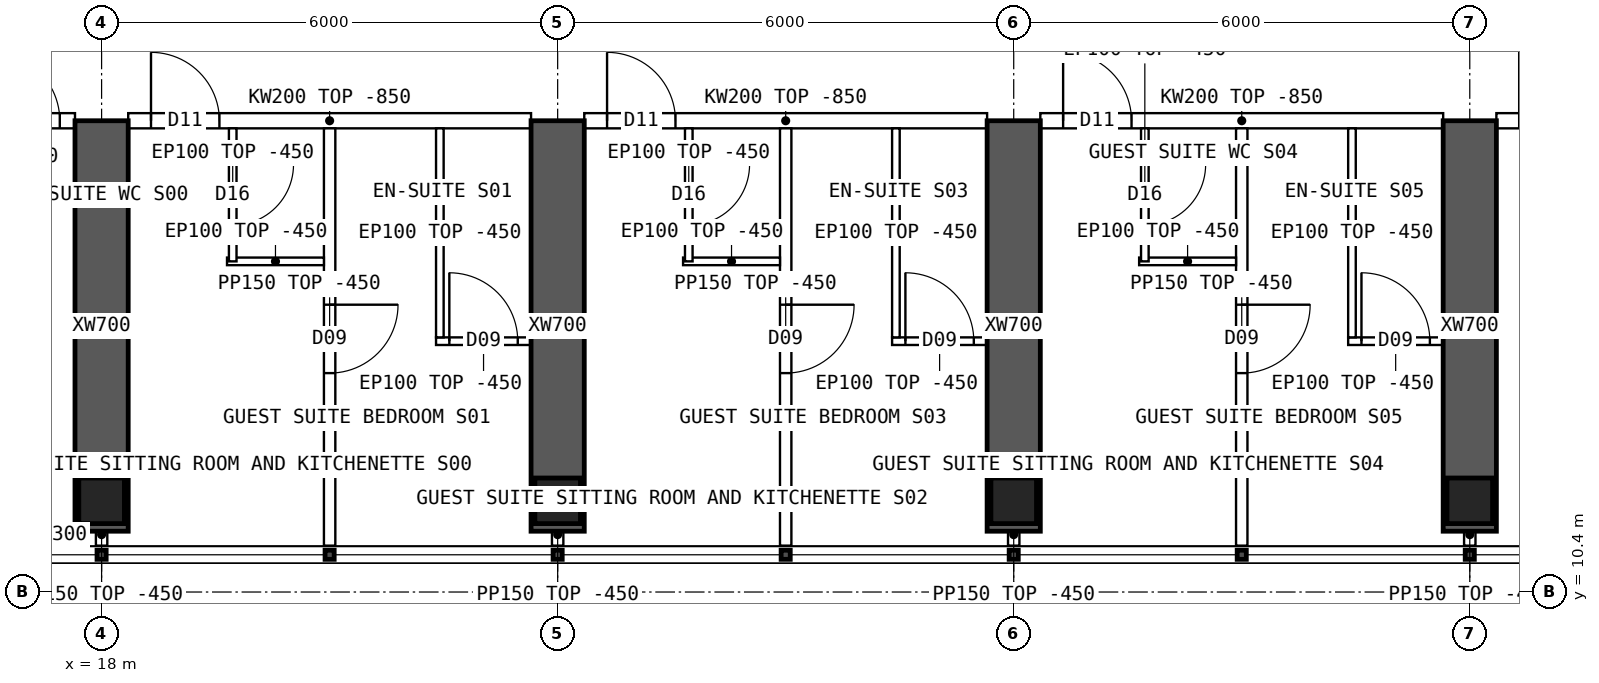
"""IFC4 building model, lengths in metres.
Left out: names, types, materials, properties, quantities, classifications, styles, units other than length and angle.
Written with IfcOpenShell. Run it as: python <this file> out.ifc"""

import sys

from ifc_helpers import new_model, si_unit, direction, frame, frame_2d, origin, origin_2d, place, context, subcontext, project, spatial, polyline, rectangle, hollow_rectangle, outline, extrude, element, fill, save


model = new_model("IFC4")
c1 = context("Model", 3, precision=1e-05, world=origin(), true_north=direction((0.0, 1.0)))
c2 = subcontext(c1, "Body", "Model", "MODEL_VIEW")
j1 = project(units=[si_unit("LENGTHUNIT", "METRE"), si_unit("PLANEANGLEUNIT", "RADIAN")], contexts=[c1])
p1 = place(None, origin())
s1 = spatial("IfcSite", under=j1, at=p1, CompositionType="ELEMENT")
p2 = place(p1, origin())
s2 = spatial("IfcBuilding", under=s1, at=p2, CompositionType="ELEMENT")
p3 = place(p2, frame((0.0, 0.0, 242.8)))
s3 = spatial("IfcBuildingStorey", under=s2, at=p3, CompositionType="ELEMENT", Elevation=242.8)
for number, where, z_axis, x_axis in (
    (1, (18.0, 11.6, 0.0), (0.0, 0.0, 1.0), (1.0, 0.0, 0.0)),
    (2, (24.0, 11.6, 0.0), (0.0, 0.0, 1.0), (1.0, 0.0, 0.0)),
    (3, (30.0, 11.6, 0.0), (0.0, 0.0, 1.0), (1.0, 0.0, 0.0)),
    (4, (36.0, 11.6, 0.0), (0.0, 0.0, 1.0), (1.0, 0.0, 0.0)),
):
    element("IfcColumn", number, at=place(p3, frame(where, z_axis=z_axis, x_axis=x_axis)), inside=s3, PredefinedType="COLUMN", context=c2, shape_type="SweptSolid", body=[
        extrude(hollow_rectangle(XDim=0.6, YDim=0.6, WallThickness=0.06, at=origin_2d()), origin(), (0.0, 0.0, 1.0), 3.75),
    ])
for number, where, z_axis, x_axis in (
    (5, (18.0, 11.2, 0.0), (0.0, 0.0, 1.0), (0.0, 1.0, 0.0)),
    (6, (24.0, 11.2, 0.0), (0.0, 0.0, 1.0), (0.0, 1.0, 0.0)),
    (7, (30.0, 11.2, 0.0), (0.0, 0.0, 1.0), (0.0, 1.0, 0.0)),
    (8, (36.0, 11.2, 0.0), (0.0, 0.0, 1.0), (0.0, 1.0, 0.0)),
):
    element("IfcWall", number, at=place(p3, frame(where, z_axis=z_axis, x_axis=x_axis)), inside=s3, PredefinedType="SHEAR", context=c2, shape_type="SweptSolid", body=[
        extrude(rectangle(XDim=5.4, YDim=0.7, at=frame_2d((2.7, 0.0))), origin(), (0.0, 0.0, 1.0), 3.75),
    ])
p4 = place(p3, frame((17.2, 11.15, 0.0), z_axis=(0.0, 0.0, 1.0), x_axis=(1.0, 0.0, 0.0)))
e9 = element("IfcWall", 9, at=p4, inside=s3, PredefinedType="SOLIDWALL", context=c2, shape_type="SweptSolid", body=[
    extrude(rectangle(XDim=0.45, YDim=0.3, at=frame_2d((0.225, 0.0))), origin(), (0.0, 0.0, 1.0), 3.3),
])
p5 = place(p3, frame((15.6, 16.6, 0.0), z_axis=(0.0, 0.0, 1.0), x_axis=(1.0, 0.0, 0.0)))
e10 = element("IfcWall", 10, at=p5, inside=s3, PredefinedType="SOLIDWALL", context=c2, shape_type="SweptSolid", body=[
    extrude(rectangle(XDim=2.05, YDim=0.2, at=frame_2d((1.025, 0.0))), origin(), (0.0, 0.0, 1.0), 3.3),
])
p6 = place(p5, frame((0.95, 0.0, 0.0)))
e11 = element("IfcOpeningElement", 11, at=p6, cuts=e10, PredefinedType="OPENING", context=c2, shape_type="SweptSolid", body=[
    extrude(rectangle(XDim=0.9, YDim=2.1, at=frame_2d((0.45, 1.05))), frame((0.0, 0.11, 0.0), z_axis=(0.0, -1.0, 0.0), x_axis=(1.0, 0.0, 0.0)), (0.0, 0.0, 1.0), 0.22),
])
p7 = place(p3, frame((18.35, 16.6, 0.0), z_axis=(0.0, 0.0, 1.0), x_axis=(1.0, 0.0, 0.0)))
e12 = element("IfcWall", 12, at=p7, inside=s3, PredefinedType="SOLIDWALL", context=c2, shape_type="SweptSolid", body=[
    extrude(outline(polyline([(0.0, 0.0), (5.3, 0.0), (5.3, 2.9), (0.0, 2.9), (0.0, 0.0)])), frame((0.0, 0.1, 0.0), z_axis=(0.0, -1.0, 0.0), x_axis=(1.0, 0.0, 0.0)), (0.0, 0.0, 1.0), 0.2),
])
p8 = place(p7, frame((0.3, 0.0, 0.0)))
e13 = element("IfcOpeningElement", 13, at=p8, cuts=e12, PredefinedType="OPENING", context=c2, shape_type="SweptSolid", body=[
    extrude(rectangle(XDim=0.9, YDim=2.1, at=frame_2d((0.45, 1.05))), frame((0.0, 0.11, 0.0), z_axis=(0.0, -1.0, 0.0), x_axis=(1.0, 0.0, 0.0)), (0.0, 0.0, 1.0), 0.22),
])
p9 = place(p3, frame((24.35, 16.6, 0.0), z_axis=(0.0, 0.0, 1.0), x_axis=(1.0, 0.0, 0.0)))
e14 = element("IfcWall", 14, at=p9, inside=s3, PredefinedType="SOLIDWALL", context=c2, shape_type="SweptSolid", body=[
    extrude(outline(polyline([(0.0, 0.0), (5.3, 0.0), (5.3, 2.9), (0.0, 2.9), (0.0, 0.0)])), frame((0.0, 0.1, 0.0), z_axis=(0.0, -1.0, 0.0), x_axis=(1.0, 0.0, 0.0)), (0.0, 0.0, 1.0), 0.2),
])
p10 = place(p9, frame((0.3, 0.0, 0.0)))
e15 = element("IfcOpeningElement", 15, at=p10, cuts=e14, PredefinedType="OPENING", context=c2, shape_type="SweptSolid", body=[
    extrude(rectangle(XDim=0.9, YDim=2.1, at=frame_2d((0.45, 1.05))), frame((0.0, 0.11, 0.0), z_axis=(0.0, -1.0, 0.0), x_axis=(1.0, 0.0, 0.0)), (0.0, 0.0, 1.0), 0.22),
])
p11 = place(p3, frame((30.35, 16.6, 0.0), z_axis=(0.0, 0.0, 1.0), x_axis=(1.0, 0.0, 0.0)))
e16 = element("IfcWall", 16, at=p11, inside=s3, PredefinedType="SOLIDWALL", context=c2, shape_type="SweptSolid", body=[
    extrude(outline(polyline([(0.0, 0.0), (5.3, 0.0), (5.3, 2.9), (0.0, 2.9), (0.0, 0.0)])), frame((0.0, 0.1, 0.0), z_axis=(0.0, -1.0, 0.0), x_axis=(1.0, 0.0, 0.0)), (0.0, 0.0, 1.0), 0.2),
])
p12 = place(p11, frame((0.3, 0.0, 0.0)))
e17 = element("IfcOpeningElement", 17, at=p12, cuts=e16, PredefinedType="OPENING", context=c2, shape_type="SweptSolid", body=[
    extrude(rectangle(XDim=0.9, YDim=2.1, at=frame_2d((0.45, 1.05))), frame((0.0, 0.11, 0.0), z_axis=(0.0, -1.0, 0.0), x_axis=(1.0, 0.0, 0.0)), (0.0, 0.0, 1.0), 0.22),
])
p13 = place(p3, frame((36.35, 16.6, 0.0), z_axis=(0.0, 0.0, 1.0), x_axis=(1.0, 0.0, 0.0)))
e18 = element("IfcWall", 18, at=p13, inside=s3, PredefinedType="SOLIDWALL", context=c2, shape_type="SweptSolid", body=[
    extrude(outline(polyline([(0.0, 0.0), (5.3, 0.0), (5.3, 2.9), (0.0, 2.9), (0.0, 0.0)])), frame((0.0, 0.1, 0.0), z_axis=(0.0, -1.0, 0.0), x_axis=(1.0, 0.0, 0.0)), (0.0, 0.0, 1.0), 0.2),
])
p14 = place(p13, frame((0.3, 0.0, 0.0)))
e19 = element("IfcOpeningElement", 19, at=p14, cuts=e18, PredefinedType="OPENING", context=c2, shape_type="SweptSolid", body=[
    extrude(rectangle(XDim=1.0, YDim=2.1, at=frame_2d((0.5, 1.05))), frame((0.0, 0.11, 0.0), z_axis=(0.0, -1.0, 0.0), x_axis=(1.0, 0.0, 0.0)), (0.0, 0.0, 1.0), 0.22),
])
p15 = place(p3, frame((21.0, 11.01, 0.0), z_axis=(0.0, 0.0, 1.0), x_axis=(0.0, 1.0, 0.0)))
e20 = element("IfcWall", 20, at=p15, inside=s3, PredefinedType="PARTITIONING", context=c2, shape_type="SweptSolid", body=[
    extrude(outline(polyline([(0.0, 0.0), (5.49, 0.0), (5.49, 2.9), (5.442, 2.9), (5.44, 3.3), (0.792, 3.3), (0.79, 2.9), (0.392, 2.9), (0.39, 3.3), (0.0, 3.3), (0.0, 0.0)])), frame((0.0, 0.075, 0.0), z_axis=(0.0, -1.0, 0.0), x_axis=(1.0, 0.0, 0.0)), (0.0, 0.0, 1.0), 0.15),
])
p16 = place(p15, frame((2.27, 0.0, 0.0)))
e21 = element("IfcOpeningElement", 21, at=p16, cuts=e20, PredefinedType="OPENING", context=c2, shape_type="SweptSolid", body=[
    extrude(rectangle(XDim=0.9, YDim=2.1, at=frame_2d((0.45, 1.05))), frame((0.0, 0.085, 0.0), z_axis=(0.0, -1.0, 0.0), x_axis=(1.0, 0.0, 0.0)), (0.0, 0.0, 1.0), 0.17),
])
p17 = place(p3, frame((23.65, 13.7, 0.0), z_axis=(0.0, 0.0, 1.0), x_axis=(-1.0, 0.0, 0.0)))
e22 = element("IfcWall", 22, at=p17, inside=s3, PredefinedType="PARTITIONING", context=c2, shape_type="SweptSolid", body=[
    extrude(rectangle(XDim=1.25, YDim=0.1, at=frame_2d((0.625, 0.0))), origin(), (0.0, 0.0, 1.0), 3.3),
])
p18 = place(p17, frame((0.175, 0.0, 0.0)))
e23 = element("IfcOpeningElement", 23, at=p18, cuts=e22, PredefinedType="OPENING", context=c2, shape_type="SweptSolid", body=[
    extrude(rectangle(XDim=0.9, YDim=2.1, at=frame_2d((0.45, 1.05))), frame((0.0, 0.06, 0.0), z_axis=(0.0, -1.0, 0.0), x_axis=(1.0, 0.0, 0.0)), (0.0, 0.0, 1.0), 0.12),
])
p19 = place(p3, frame((22.45, 13.75, 0.0), z_axis=(0.0, 0.0, 1.0), x_axis=(0.0, 1.0, 0.0)))
e24 = element("IfcWall", 24, at=p19, inside=s3, PredefinedType="PARTITIONING", context=c2, shape_type="SweptSolid", body=[
    extrude(outline(polyline([(0.0, 0.0), (2.75, 0.0), (2.75, 2.9), (2.702, 2.9), (2.7, 3.3), (0.0, 3.3), (0.0, 0.0)])), frame((0.0, 0.05, 0.0), z_axis=(0.0, -1.0, 0.0), x_axis=(1.0, 0.0, 0.0)), (0.0, 0.0, 1.0), 0.1),
])
p20 = place(p3, frame((19.65, 14.75, 0.0), z_axis=(0.0, 0.0, 1.0), x_axis=(1.0, 0.0, 0.0)))
e25 = element("IfcWall", 25, at=p20, inside=s3, PredefinedType="PARTITIONING", context=c2, shape_type="SweptSolid", body=[
    extrude(rectangle(XDim=1.275, YDim=0.1, at=frame_2d((0.638, 0.0))), origin(), (0.0, 0.0, 1.0), 3.3),
])
p21 = place(p3, frame((19.725, 14.75, 0.0), z_axis=(0.0, 0.0, 1.0), x_axis=(0.0, 1.0, 0.0)))
e26 = element("IfcWall", 26, at=p21, inside=s3, PredefinedType="PARTITIONING", context=c2, shape_type="SweptSolid", body=[
    extrude(outline(polyline([(0.0, 0.0), (1.75, 0.0), (1.75, 2.9), (1.702, 2.9), (1.7, 3.3), (0.0, 3.3), (0.0, 0.0)])), frame((0.0, 0.05, 0.0), z_axis=(0.0, -1.0, 0.0), x_axis=(1.0, 0.0, 0.0)), (0.0, 0.0, 1.0), 0.1),
])
p22 = place(p21, frame((0.475, 0.0, 0.0)))
e27 = element("IfcOpeningElement", 27, at=p22, cuts=e26, PredefinedType="OPENING", context=c2, shape_type="SweptSolid", body=[
    extrude(rectangle(XDim=0.8, YDim=2.1, at=frame_2d((0.4, 1.05))), frame((0.0, 0.06, 0.0), z_axis=(0.0, -1.0, 0.0), x_axis=(1.0, 0.0, 0.0)), (0.0, 0.0, 1.0), 0.12),
])
p23 = place(p3, frame((27.0, 11.01, 0.0), z_axis=(0.0, 0.0, 1.0), x_axis=(0.0, 1.0, 0.0)))
e28 = element("IfcWall", 28, at=p23, inside=s3, PredefinedType="PARTITIONING", context=c2, shape_type="SweptSolid", body=[
    extrude(outline(polyline([(0.0, 0.0), (5.49, 0.0), (5.49, 2.9), (5.442, 2.9), (5.44, 3.3), (0.792, 3.3), (0.79, 2.9), (0.392, 2.9), (0.39, 3.3), (0.0, 3.3), (0.0, 0.0)])), frame((0.0, 0.075, 0.0), z_axis=(0.0, -1.0, 0.0), x_axis=(1.0, 0.0, 0.0)), (0.0, 0.0, 1.0), 0.15),
])
p24 = place(p23, frame((2.27, 0.0, 0.0)))
e29 = element("IfcOpeningElement", 29, at=p24, cuts=e28, PredefinedType="OPENING", context=c2, shape_type="SweptSolid", body=[
    extrude(rectangle(XDim=0.9, YDim=2.1, at=frame_2d((0.45, 1.05))), frame((0.0, 0.085, 0.0), z_axis=(0.0, -1.0, 0.0), x_axis=(1.0, 0.0, 0.0)), (0.0, 0.0, 1.0), 0.17),
])
p25 = place(p3, frame((29.65, 13.7, 0.0), z_axis=(0.0, 0.0, 1.0), x_axis=(-1.0, 0.0, 0.0)))
e30 = element("IfcWall", 30, at=p25, inside=s3, PredefinedType="PARTITIONING", context=c2, shape_type="SweptSolid", body=[
    extrude(rectangle(XDim=1.25, YDim=0.1, at=frame_2d((0.625, 0.0))), origin(), (0.0, 0.0, 1.0), 3.3),
])
p26 = place(p25, frame((0.175, 0.0, 0.0)))
e31 = element("IfcOpeningElement", 31, at=p26, cuts=e30, PredefinedType="OPENING", context=c2, shape_type="SweptSolid", body=[
    extrude(rectangle(XDim=0.9, YDim=2.1, at=frame_2d((0.45, 1.05))), frame((0.0, 0.06, 0.0), z_axis=(0.0, -1.0, 0.0), x_axis=(1.0, 0.0, 0.0)), (0.0, 0.0, 1.0), 0.12),
])
p27 = place(p3, frame((28.45, 13.75, 0.0), z_axis=(0.0, 0.0, 1.0), x_axis=(0.0, 1.0, 0.0)))
e32 = element("IfcWall", 32, at=p27, inside=s3, PredefinedType="PARTITIONING", context=c2, shape_type="SweptSolid", body=[
    extrude(outline(polyline([(0.0, 0.0), (2.75, 0.0), (2.75, 2.9), (2.702, 2.9), (2.7, 3.3), (0.0, 3.3), (0.0, 0.0)])), frame((0.0, 0.05, 0.0), z_axis=(0.0, -1.0, 0.0), x_axis=(1.0, 0.0, 0.0)), (0.0, 0.0, 1.0), 0.1),
])
p28 = place(p3, frame((25.65, 14.75, 0.0), z_axis=(0.0, 0.0, 1.0), x_axis=(1.0, 0.0, 0.0)))
e33 = element("IfcWall", 33, at=p28, inside=s3, PredefinedType="PARTITIONING", context=c2, shape_type="SweptSolid", body=[
    extrude(rectangle(XDim=1.275, YDim=0.1, at=frame_2d((0.638, 0.0))), origin(), (0.0, 0.0, 1.0), 3.3),
])
p29 = place(p3, frame((25.725, 14.75, 0.0), z_axis=(0.0, 0.0, 1.0), x_axis=(0.0, 1.0, 0.0)))
e34 = element("IfcWall", 34, at=p29, inside=s3, PredefinedType="PARTITIONING", context=c2, shape_type="SweptSolid", body=[
    extrude(outline(polyline([(0.0, 0.0), (1.75, 0.0), (1.75, 2.9), (1.702, 2.9), (1.7, 3.3), (0.0, 3.3), (0.0, 0.0)])), frame((0.0, 0.05, 0.0), z_axis=(0.0, -1.0, 0.0), x_axis=(1.0, 0.0, 0.0)), (0.0, 0.0, 1.0), 0.1),
])
p30 = place(p29, frame((0.475, 0.0, 0.0)))
e35 = element("IfcOpeningElement", 35, at=p30, cuts=e34, PredefinedType="OPENING", context=c2, shape_type="SweptSolid", body=[
    extrude(rectangle(XDim=0.8, YDim=2.1, at=frame_2d((0.4, 1.05))), frame((0.0, 0.06, 0.0), z_axis=(0.0, -1.0, 0.0), x_axis=(1.0, 0.0, 0.0)), (0.0, 0.0, 1.0), 0.12),
])
p31 = place(p3, frame((33.0, 11.01, 0.0), z_axis=(0.0, 0.0, 1.0), x_axis=(0.0, 1.0, 0.0)))
e36 = element("IfcWall", 36, at=p31, inside=s3, PredefinedType="PARTITIONING", context=c2, shape_type="SweptSolid", body=[
    extrude(outline(polyline([(0.0, 0.0), (5.49, 0.0), (5.49, 2.9), (5.442, 2.9), (5.44, 3.3), (0.792, 3.3), (0.79, 2.9), (0.392, 2.9), (0.39, 3.3), (0.0, 3.3), (0.0, 0.0)])), frame((0.0, 0.075, 0.0), z_axis=(0.0, -1.0, 0.0), x_axis=(1.0, 0.0, 0.0)), (0.0, 0.0, 1.0), 0.15),
])
p32 = place(p31, frame((2.27, 0.0, 0.0)))
e37 = element("IfcOpeningElement", 37, at=p32, cuts=e36, PredefinedType="OPENING", context=c2, shape_type="SweptSolid", body=[
    extrude(rectangle(XDim=0.9, YDim=2.1, at=frame_2d((0.45, 1.05))), frame((0.0, 0.085, 0.0), z_axis=(0.0, -1.0, 0.0), x_axis=(1.0, 0.0, 0.0)), (0.0, 0.0, 1.0), 0.17),
])
p33 = place(p3, frame((35.65, 13.7, 0.0), z_axis=(0.0, 0.0, 1.0), x_axis=(-1.0, 0.0, 0.0)))
e38 = element("IfcWall", 38, at=p33, inside=s3, PredefinedType="PARTITIONING", context=c2, shape_type="SweptSolid", body=[
    extrude(rectangle(XDim=1.25, YDim=0.1, at=frame_2d((0.625, 0.0))), origin(), (0.0, 0.0, 1.0), 3.3),
])
p34 = place(p33, frame((0.175, 0.0, 0.0)))
e39 = element("IfcOpeningElement", 39, at=p34, cuts=e38, PredefinedType="OPENING", context=c2, shape_type="SweptSolid", body=[
    extrude(rectangle(XDim=0.9, YDim=2.1, at=frame_2d((0.45, 1.05))), frame((0.0, 0.06, 0.0), z_axis=(0.0, -1.0, 0.0), x_axis=(1.0, 0.0, 0.0)), (0.0, 0.0, 1.0), 0.12),
])
p35 = place(p3, frame((34.45, 13.75, 0.0), z_axis=(0.0, 0.0, 1.0), x_axis=(0.0, 1.0, 0.0)))
e40 = element("IfcWall", 40, at=p35, inside=s3, PredefinedType="PARTITIONING", context=c2, shape_type="SweptSolid", body=[
    extrude(outline(polyline([(0.0, 0.0), (2.75, 0.0), (2.75, 2.9), (2.702, 2.9), (2.7, 3.3), (0.0, 3.3), (0.0, 0.0)])), frame((0.0, 0.05, 0.0), z_axis=(0.0, -1.0, 0.0), x_axis=(1.0, 0.0, 0.0)), (0.0, 0.0, 1.0), 0.1),
])
p36 = place(p3, frame((31.65, 14.75, 0.0), z_axis=(0.0, 0.0, 1.0), x_axis=(1.0, 0.0, 0.0)))
e41 = element("IfcWall", 41, at=p36, inside=s3, PredefinedType="PARTITIONING", context=c2, shape_type="SweptSolid", body=[
    extrude(rectangle(XDim=1.275, YDim=0.1, at=frame_2d((0.638, 0.0))), origin(), (0.0, 0.0, 1.0), 3.3),
])
p37 = place(p3, frame((31.725, 14.75, 0.0), z_axis=(0.0, 0.0, 1.0), x_axis=(0.0, 1.0, 0.0)))
e42 = element("IfcWall", 42, at=p37, inside=s3, PredefinedType="PARTITIONING", context=c2, shape_type="SweptSolid", body=[
    extrude(outline(polyline([(0.0, 0.0), (1.75, 0.0), (1.75, 2.9), (1.702, 2.9), (1.7, 3.3), (0.0, 3.3), (0.0, 0.0)])), frame((0.0, 0.05, 0.0), z_axis=(0.0, -1.0, 0.0), x_axis=(1.0, 0.0, 0.0)), (0.0, 0.0, 1.0), 0.1),
])
p38 = place(p37, frame((0.475, 0.0, 0.0)))
e43 = element("IfcOpeningElement", 43, at=p38, cuts=e42, PredefinedType="OPENING", context=c2, shape_type="SweptSolid", body=[
    extrude(rectangle(XDim=0.8, YDim=2.1, at=frame_2d((0.4, 1.05))), frame((0.0, 0.06, 0.0), z_axis=(0.0, -1.0, 0.0), x_axis=(1.0, 0.0, 0.0)), (0.0, 0.0, 1.0), 0.12),
])
for number, where, z_axis, x_axis in (
    (44, (18.0, 11.3, 0.0), (0.0, 0.0, 1.0), (0.0, -1.0, 0.0)),
    (45, (24.0, 11.3, 0.0), (0.0, 0.0, 1.0), (0.0, -1.0, 0.0)),
    (46, (30.0, 11.3, 0.0), (0.0, 0.0, 1.0), (0.0, -1.0, 0.0)),
    (47, (36.0, 11.3, 0.0), (0.0, 0.0, 1.0), (0.0, -1.0, 0.0)),
):
    element("IfcWall", number, at=place(p3, frame(where, z_axis=z_axis, x_axis=x_axis)), inside=s3, PredefinedType="PARTITIONING", context=c2, shape_type="SweptSolid", body=[
        extrude(rectangle(XDim=0.29, YDim=0.15, at=frame_2d((0.145, 0.0))), origin(), (0.0, 0.0, 1.0), 3.3),
    ])
p39 = place(p8, origin())
e48 = element("IfcDoor", 48, at=p39, inside=s3, OperationType="SINGLE_SWING_LEFT", PredefinedType="DOOR", context=c2, shape_type="SweptSolid", body=[
    extrude(rectangle(XDim=0.9, YDim=2.1, at=frame_2d((0.45, 1.05))), frame((0.0, 0.025, 0.0), z_axis=(0.0, -1.0, 0.0), x_axis=(1.0, 0.0, 0.0)), (0.0, 0.0, 1.0), 0.05),
])
fill(e13, e48)
p40 = place(p18, origin())
e49 = element("IfcDoor", 49, at=p40, inside=s3, OperationType="SINGLE_SWING_RIGHT", PredefinedType="DOOR", context=c2, shape_type="SweptSolid", body=[
    extrude(rectangle(XDim=0.9, YDim=2.1, at=frame_2d((0.45, 1.05))), frame((0.0, 0.025, 0.0), z_axis=(0.0, -1.0, 0.0), x_axis=(1.0, 0.0, 0.0)), (0.0, 0.0, 1.0), 0.05),
])
fill(e23, e49)
p41 = place(p16, origin())
e50 = element("IfcDoor", 50, at=p41, inside=s3, OperationType="SINGLE_SWING_RIGHT", PredefinedType="DOOR", context=c2, shape_type="SweptSolid", body=[
    extrude(rectangle(XDim=0.9, YDim=2.1, at=frame_2d((0.45, 1.05))), frame((0.0, 0.025, 0.0), z_axis=(0.0, -1.0, 0.0), x_axis=(1.0, 0.0, 0.0)), (0.0, 0.0, 1.0), 0.05),
])
fill(e21, e50)
p42 = place(p22, origin())
e51 = element("IfcDoor", 51, at=p42, inside=s3, OperationType="SINGLE_SWING_RIGHT", PredefinedType="DOOR", context=c2, shape_type="SweptSolid", body=[
    extrude(rectangle(XDim=0.8, YDim=2.1, at=frame_2d((0.4, 1.05))), frame((0.0, 0.025, 0.0), z_axis=(0.0, -1.0, 0.0), x_axis=(1.0, 0.0, 0.0)), (0.0, 0.0, 1.0), 0.05),
])
fill(e27, e51)
p43 = place(p10, origin())
e52 = element("IfcDoor", 52, at=p43, inside=s3, OperationType="SINGLE_SWING_LEFT", PredefinedType="DOOR", context=c2, shape_type="SweptSolid", body=[
    extrude(rectangle(XDim=0.9, YDim=2.1, at=frame_2d((0.45, 1.05))), frame((0.0, 0.025, 0.0), z_axis=(0.0, -1.0, 0.0), x_axis=(1.0, 0.0, 0.0)), (0.0, 0.0, 1.0), 0.05),
])
fill(e15, e52)
p44 = place(p26, origin())
e53 = element("IfcDoor", 53, at=p44, inside=s3, OperationType="SINGLE_SWING_RIGHT", PredefinedType="DOOR", context=c2, shape_type="SweptSolid", body=[
    extrude(rectangle(XDim=0.9, YDim=2.1, at=frame_2d((0.45, 1.05))), frame((0.0, 0.025, 0.0), z_axis=(0.0, -1.0, 0.0), x_axis=(1.0, 0.0, 0.0)), (0.0, 0.0, 1.0), 0.05),
])
fill(e31, e53)
p45 = place(p24, origin())
e54 = element("IfcDoor", 54, at=p45, inside=s3, OperationType="SINGLE_SWING_RIGHT", PredefinedType="DOOR", context=c2, shape_type="SweptSolid", body=[
    extrude(rectangle(XDim=0.9, YDim=2.1, at=frame_2d((0.45, 1.05))), frame((0.0, 0.025, 0.0), z_axis=(0.0, -1.0, 0.0), x_axis=(1.0, 0.0, 0.0)), (0.0, 0.0, 1.0), 0.05),
])
fill(e29, e54)
p46 = place(p30, origin())
e55 = element("IfcDoor", 55, at=p46, inside=s3, OperationType="SINGLE_SWING_RIGHT", PredefinedType="DOOR", context=c2, shape_type="SweptSolid", body=[
    extrude(rectangle(XDim=0.8, YDim=2.1, at=frame_2d((0.4, 1.05))), frame((0.0, 0.025, 0.0), z_axis=(0.0, -1.0, 0.0), x_axis=(1.0, 0.0, 0.0)), (0.0, 0.0, 1.0), 0.05),
])
fill(e35, e55)
p47 = place(p12, origin())
e56 = element("IfcDoor", 56, at=p47, inside=s3, OperationType="SINGLE_SWING_LEFT", PredefinedType="DOOR", context=c2, shape_type="SweptSolid", body=[
    extrude(rectangle(XDim=0.9, YDim=2.1, at=frame_2d((0.45, 1.05))), frame((0.0, 0.025, 0.0), z_axis=(0.0, -1.0, 0.0), x_axis=(1.0, 0.0, 0.0)), (0.0, 0.0, 1.0), 0.05),
])
fill(e17, e56)
p48 = place(p34, origin())
e57 = element("IfcDoor", 57, at=p48, inside=s3, OperationType="SINGLE_SWING_RIGHT", PredefinedType="DOOR", context=c2, shape_type="SweptSolid", body=[
    extrude(rectangle(XDim=0.9, YDim=2.1, at=frame_2d((0.45, 1.05))), frame((0.0, 0.025, 0.0), z_axis=(0.0, -1.0, 0.0), x_axis=(1.0, 0.0, 0.0)), (0.0, 0.0, 1.0), 0.05),
])
fill(e39, e57)
p49 = place(p32, origin())
e58 = element("IfcDoor", 58, at=p49, inside=s3, OperationType="SINGLE_SWING_RIGHT", PredefinedType="DOOR", context=c2, shape_type="SweptSolid", body=[
    extrude(rectangle(XDim=0.9, YDim=2.1, at=frame_2d((0.45, 1.05))), frame((0.0, 0.025, 0.0), z_axis=(0.0, -1.0, 0.0), x_axis=(1.0, 0.0, 0.0)), (0.0, 0.0, 1.0), 0.05),
])
fill(e37, e58)
p50 = place(p38, origin())
e59 = element("IfcDoor", 59, at=p50, inside=s3, OperationType="SINGLE_SWING_RIGHT", PredefinedType="DOOR", context=c2, shape_type="SweptSolid", body=[
    extrude(rectangle(XDim=0.8, YDim=2.1, at=frame_2d((0.4, 1.05))), frame((0.0, 0.025, 0.0), z_axis=(0.0, -1.0, 0.0), x_axis=(1.0, 0.0, 0.0)), (0.0, 0.0, 1.0), 0.05),
])
fill(e43, e59)
p51 = place(p6, origin())
e60 = element("IfcDoor", 60, at=p51, inside=s3, OperationType="SINGLE_SWING_LEFT", PredefinedType="DOOR", context=c2, shape_type="SweptSolid", body=[
    extrude(rectangle(XDim=0.9, YDim=2.1, at=frame_2d((0.45, 1.05))), frame((0.0, 0.025, 0.0), z_axis=(0.0, -1.0, 0.0), x_axis=(1.0, 0.0, 0.0)), (0.0, 0.0, 1.0), 0.05),
])
fill(e11, e60)
save(model, sys.argv[1])
